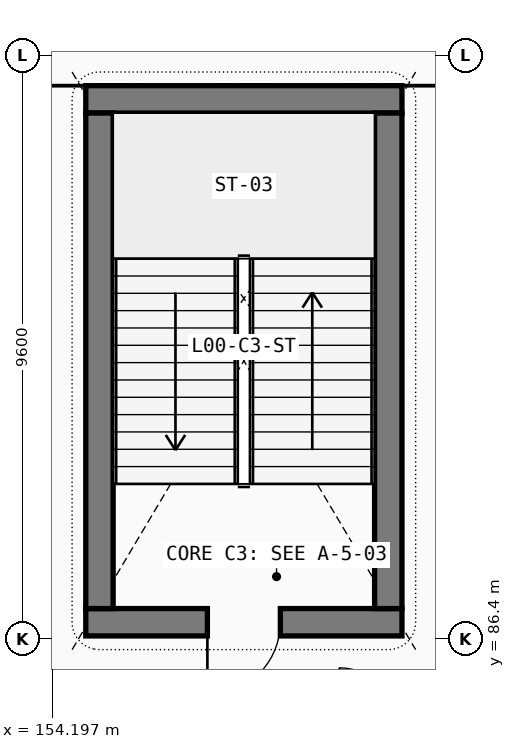
"""IFC4 building model, lengths in metres.
Left out: names, types, materials, properties, quantities, classifications, styles, units other than length and angle.
Written with IfcOpenShell. Run it as: python <this file> out.ifc"""

import sys

from ifc_helpers import new_model, si_unit, direction, frame, frame_2d, origin, place, context, subcontext, project, spatial, rectangle, extrude, element, fill, save


model = new_model("IFC4")
c1 = context("Model", 3, precision=1e-05, world=origin(), true_north=direction((0.0, 1.0)))
c2 = subcontext(c1, "Body", "Model", "MODEL_VIEW")
j1 = project(units=[si_unit("LENGTHUNIT", "METRE"), si_unit("PLANEANGLEUNIT", "RADIAN")], contexts=[c1])
p1 = place(None, origin())
s1 = spatial("IfcSite", under=j1, at=p1, CompositionType="ELEMENT")
p2 = place(p1, origin())
s2 = spatial("IfcBuilding", under=s1, at=p2, CompositionType="ELEMENT")
p3 = place(p2, origin())
s3 = spatial("IfcBuildingStorey", under=s2, at=p3, CompositionType="ELEMENT", Elevation=0.0)
p4 = place(p3, frame((154.75, 86.675, 0.0), z_axis=(0.0, 0.0, 1.0), x_axis=(1.0, 0.0, 0.0)))
e1 = element("IfcWall", 1, at=p4, inside=s3, PredefinedType="SHEAR", context=c2, shape_type="SweptSolid", body=[
    extrude(rectangle(XDim=5.2, YDim=0.45, at=frame_2d((2.6, 0.0))), origin(), (0.0, 0.0, 1.0), 4.5),
])
p5 = place(p4, frame((3.2, 0.0, 0.0), z_axis=(0.0, 0.0, 1.0), x_axis=(-1.0, 0.0, 0.0)))
e2 = element("IfcOpeningElement", 2, at=p5, cuts=e1, PredefinedType="OPENING", context=c2, shape_type="SweptSolid", body=[
    extrude(rectangle(XDim=1.2, YDim=2.2, at=frame_2d((0.6, 1.1))), frame((0.0, 0.235, 0.0), z_axis=(0.0, -1.0, 0.0), x_axis=(1.0, 0.0, 0.0)), (0.0, 0.0, 1.0), 0.47),
])
p6 = place(p3, frame((159.95, 95.275, 0.0), z_axis=(0.0, 0.0, 1.0), x_axis=(-1.0, 0.0, 0.0)))
e3 = element("IfcWall", 3, at=p6, inside=s3, PredefinedType="SHEAR", context=c2, shape_type="SweptSolid", body=[
    extrude(rectangle(XDim=5.2, YDim=0.45, at=frame_2d((2.6, 0.0))), origin(), (0.0, 0.0, 1.0), 4.5),
])
for number, where, z_axis, x_axis in (
    (4, (154.975, 95.05, 0.0), (0.0, 0.0, 1.0), (0.0, -1.0, 0.0)),
    (5, (159.725, 86.9, 0.0), (0.0, 0.0, 1.0), (0.0, 1.0, 0.0)),
):
    element("IfcWall", number, at=place(p3, frame(where, z_axis=z_axis, x_axis=x_axis)), inside=s3, PredefinedType="SHEAR", context=c2, shape_type="SweptSolid", body=[
        extrude(rectangle(XDim=8.15, YDim=0.45, at=frame_2d((4.075, 0.0))), origin(), (0.0, 0.0, 1.0), 4.5),
    ])
p7 = place(p5, origin())
e6 = element("IfcDoor", 6, at=p7, inside=s3, OperationType="SINGLE_SWING_RIGHT", PredefinedType="DOOR", context=c2, shape_type="SweptSolid", body=[
    extrude(rectangle(XDim=1.2, YDim=2.2, at=frame_2d((0.6, 1.1))), frame((0.0, 0.025, 0.0), z_axis=(0.0, -1.0, 0.0), x_axis=(1.0, 0.0, 0.0)), (0.0, 0.0, 1.0), 0.05),
])
fill(e2, e6)
save(model, sys.argv[1])
